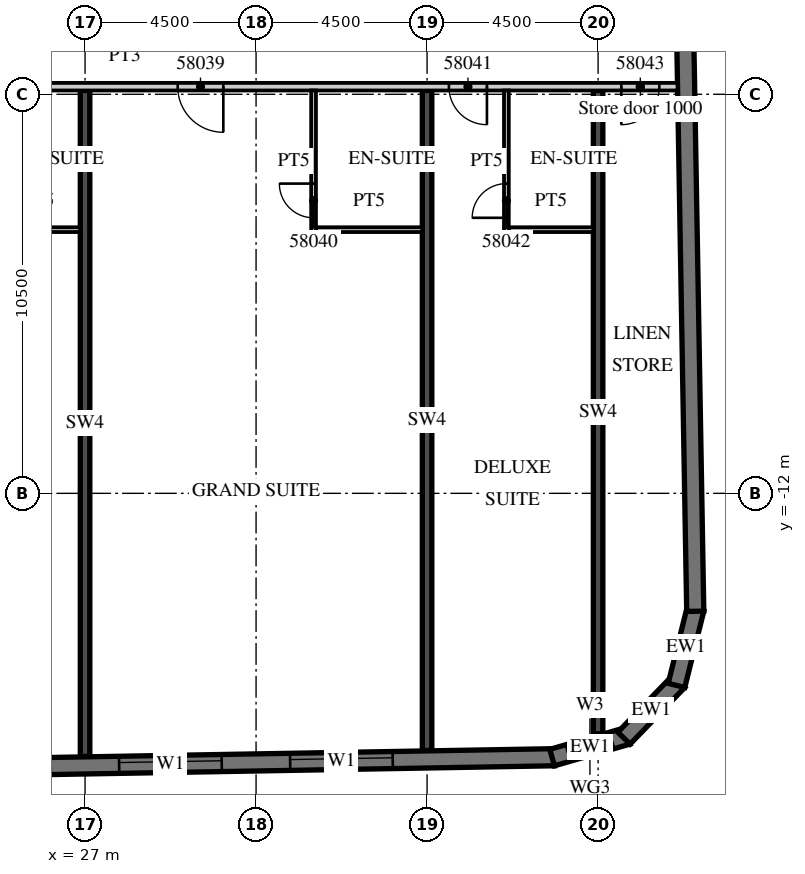
"""IFC4 building model, lengths in metres.
Left out: names, types, materials, properties, quantities, classifications, styles, units other than length and angle.
Written with IfcOpenShell. Run it as: python <this file> out.ifc"""

import sys

from ifc_helpers import new_model, si_unit, direction, frame, frame_2d, origin, place, context, subcontext, project, spatial, polyline, rectangle, outline, extrude, element, fill, save


model = new_model("IFC4")
c1 = context("Model", 3, precision=1e-05, world=origin(), true_north=direction((0.0, 1.0)))
c2 = subcontext(c1, "Body", "Model", "MODEL_VIEW")
j1 = project(units=[si_unit("LENGTHUNIT", "METRE"), si_unit("PLANEANGLEUNIT", "RADIAN")], contexts=[c1])
p1 = place(None, origin())
s1 = spatial("IfcSite", under=j1, at=p1, CompositionType="ELEMENT")
p2 = place(p1, origin())
s2 = spatial("IfcBuilding", under=s1, at=p2, CompositionType="ELEMENT")
p3 = place(p2, frame((0.0, 0.0, 237.5)))
s3 = spatial("IfcBuildingStorey", under=s2, at=p3, CompositionType="ELEMENT", Elevation=237.5)
p4 = place(p3, frame((27.0, -18.922, 0.0), z_axis=(0.0, 0.0, 1.0), x_axis=(0.0, 1.0, 0.0)))
e1 = element("IfcWall", 1, at=p4, inside=s3, PredefinedType="SHEAR", context=c2, shape_type="SweptSolid", body=[
    extrude(rectangle(XDim=17.522, YDim=0.25, at=frame_2d((8.761, 0.0))), origin(), (0.0, 0.0, 1.0), 3.3),
])
p5 = place(p3, frame((36.0, -18.765, 0.0), z_axis=(0.0, 0.0, 1.0), x_axis=(0.0, 1.0, 0.0)))
e2 = element("IfcWall", 2, at=p5, inside=s3, PredefinedType="SHEAR", context=c2, shape_type="SweptSolid", body=[
    extrude(rectangle(XDim=17.365, YDim=0.25, at=frame_2d((8.683, 0.0))), origin(), (0.0, 0.0, 1.0), 3.3),
])
p6 = place(p3, frame((40.5, -18.325, 0.0), z_axis=(0.0, 0.0, 1.0), x_axis=(0.0, 1.0, 0.0)))
e3 = element("IfcWall", 3, at=p6, inside=s3, PredefinedType="SHEAR", context=c2, shape_type="SweptSolid", body=[
    extrude(rectangle(XDim=16.925, YDim=0.25, at=frame_2d((8.463, 0.0))), origin(), (0.0, 0.0, 1.0), 3.3),
])
p7 = place(p3, frame((-13.504, -19.866, 0.0), z_axis=(0.0, 0.0, 1.0), x_axis=(0.999847672978, 0.017453676992, 0.0)))
e4 = element("IfcWall", 4, at=p7, inside=s3, PredefinedType="SOLIDWALL", context=c2, shape_type="SweptSolid", body=[
    extrude(rectangle(XDim=52.86, YDim=0.45, at=frame_2d((26.43, 0.0))), origin(), (0.0, 0.0, 1.0), 3.02),
])
p8 = place(p7, frame((0.9, 0.0, 0.45)))
e5 = element("IfcOpeningElement", 5, at=p8, cuts=e4, PredefinedType="OPENING", context=c2, shape_type="SweptSolid", body=[
    extrude(rectangle(XDim=2.7, YDim=2.25, at=frame_2d((1.35, 1.125))), frame((0.0, 0.235, 0.0), z_axis=(0.0, -1.0, 0.0), x_axis=(1.0, 0.0, 0.0)), (0.0, 0.0, 1.0), 0.47),
])
p9 = place(p7, frame((5.401, 0.0, 0.45)))
e6 = element("IfcOpeningElement", 6, at=p9, cuts=e4, PredefinedType="OPENING", context=c2, shape_type="SweptSolid", body=[
    extrude(rectangle(XDim=2.7, YDim=2.25, at=frame_2d((1.35, 1.125))), frame((0.0, 0.235, 0.0), z_axis=(0.0, -1.0, 0.0), x_axis=(1.0, 0.0, 0.0)), (0.0, 0.0, 1.0), 0.47),
])
p10 = place(p7, frame((9.902, 0.0, 0.45)))
e7 = element("IfcOpeningElement", 7, at=p10, cuts=e4, PredefinedType="OPENING", context=c2, shape_type="SweptSolid", body=[
    extrude(rectangle(XDim=2.7, YDim=2.25, at=frame_2d((1.35, 1.125))), frame((0.0, 0.235, 0.0), z_axis=(0.0, -1.0, 0.0), x_axis=(1.0, 0.0, 0.0)), (0.0, 0.0, 1.0), 0.47),
])
p11 = place(p7, frame((14.402, 0.0, 0.45)))
e8 = element("IfcOpeningElement", 8, at=p11, cuts=e4, PredefinedType="OPENING", context=c2, shape_type="SweptSolid", body=[
    extrude(rectangle(XDim=2.7, YDim=2.25, at=frame_2d((1.35, 1.125))), frame((0.0, 0.235, 0.0), z_axis=(0.0, -1.0, 0.0), x_axis=(1.0, 0.0, 0.0)), (0.0, 0.0, 1.0), 0.47),
])
p12 = place(p7, frame((18.903, 0.0, 0.45)))
e9 = element("IfcOpeningElement", 9, at=p12, cuts=e4, PredefinedType="OPENING", context=c2, shape_type="SweptSolid", body=[
    extrude(rectangle(XDim=2.7, YDim=2.25, at=frame_2d((1.35, 1.125))), frame((0.0, 0.235, 0.0), z_axis=(0.0, -1.0, 0.0), x_axis=(1.0, 0.0, 0.0)), (0.0, 0.0, 1.0), 0.47),
])
p13 = place(p7, frame((23.404, 0.0, 0.45)))
e10 = element("IfcOpeningElement", 10, at=p13, cuts=e4, PredefinedType="OPENING", context=c2, shape_type="SweptSolid", body=[
    extrude(rectangle(XDim=2.7, YDim=2.25, at=frame_2d((1.35, 1.125))), frame((0.0, 0.235, 0.0), z_axis=(0.0, -1.0, 0.0), x_axis=(1.0, 0.0, 0.0)), (0.0, 0.0, 1.0), 0.47),
])
p14 = place(p7, frame((27.904, 0.0, 0.45)))
e11 = element("IfcOpeningElement", 11, at=p14, cuts=e4, PredefinedType="OPENING", context=c2, shape_type="SweptSolid", body=[
    extrude(rectangle(XDim=2.7, YDim=2.25, at=frame_2d((1.35, 1.125))), frame((0.0, 0.235, 0.0), z_axis=(0.0, -1.0, 0.0), x_axis=(1.0, 0.0, 0.0)), (0.0, 0.0, 1.0), 0.47),
])
p15 = place(p7, frame((32.405, 0.0, 0.45)))
e12 = element("IfcOpeningElement", 12, at=p15, cuts=e4, PredefinedType="OPENING", context=c2, shape_type="SweptSolid", body=[
    extrude(rectangle(XDim=2.7, YDim=2.25, at=frame_2d((1.35, 1.125))), frame((0.0, 0.235, 0.0), z_axis=(0.0, -1.0, 0.0), x_axis=(1.0, 0.0, 0.0)), (0.0, 0.0, 1.0), 0.47),
])
p16 = place(p7, frame((36.906, 0.0, 0.45)))
e13 = element("IfcOpeningElement", 13, at=p16, cuts=e4, PredefinedType="OPENING", context=c2, shape_type="SweptSolid", body=[
    extrude(rectangle(XDim=2.7, YDim=2.25, at=frame_2d((1.35, 1.125))), frame((0.0, 0.235, 0.0), z_axis=(0.0, -1.0, 0.0), x_axis=(1.0, 0.0, 0.0)), (0.0, 0.0, 1.0), 0.47),
])
p17 = place(p7, frame((41.406, 0.0, 0.45)))
e14 = element("IfcOpeningElement", 14, at=p17, cuts=e4, PredefinedType="OPENING", context=c2, shape_type="SweptSolid", body=[
    extrude(rectangle(XDim=2.7, YDim=2.25, at=frame_2d((1.35, 1.125))), frame((0.0, 0.235, 0.0), z_axis=(0.0, -1.0, 0.0), x_axis=(1.0, 0.0, 0.0)), (0.0, 0.0, 1.0), 0.47),
])
p18 = place(p7, frame((45.907, 0.0, 0.45)))
e15 = element("IfcOpeningElement", 15, at=p18, cuts=e4, PredefinedType="OPENING", context=c2, shape_type="SweptSolid", body=[
    extrude(rectangle(XDim=2.7, YDim=2.25, at=frame_2d((1.35, 1.125))), frame((0.0, 0.235, 0.0), z_axis=(0.0, -1.0, 0.0), x_axis=(1.0, 0.0, 0.0)), (0.0, 0.0, 1.0), 0.47),
])
p19 = place(p3, frame((39.29, -18.952, 0.0), z_axis=(0.0, 0.0, 1.0), x_axis=(0.961247584925, 0.275686562016, 0.0)))
e16 = element("IfcWall", 16, at=p19, inside=s3, PredefinedType="SOLIDWALL", context=c2, shape_type="SweptSolid", body=[
    extrude(outline(polyline([(0.0, -0.225), (2.071, -0.225), (1.95, 0.225), (0.121, 0.225), (0.0, -0.225)])), origin(), (0.0, 0.0, 1.0), 3.02),
])
p20 = place(p19, frame((0.435, 0.0, 0.45)))
e17 = element("IfcOpeningElement", 17, at=p20, cuts=e16, PredefinedType="OPENING", context=c2, shape_type="SweptSolid", body=[
    extrude(rectangle(XDim=1.2, YDim=2.25, at=frame_2d((0.6, 1.125))), frame((0.0, 0.235, 0.0), z_axis=(0.0, -1.0, 0.0), x_axis=(1.0, 0.0, 0.0)), (0.0, 0.0, 1.0), 0.47),
])
p21 = place(p3, frame((41.181, -18.442, 0.0), z_axis=(0.0, 0.0, 1.0), x_axis=(0.694678672846, 0.719320193998, 0.0)))
e18 = element("IfcWall", 18, at=p21, inside=s3, PredefinedType="SOLIDWALL", context=c2, shape_type="SweptSolid", body=[
    extrude(outline(polyline([(0.0, -0.225), (2.071, -0.225), (1.95, 0.225), (0.121, 0.225), (0.0, -0.225)])), origin(), (0.0, 0.0, 1.0), 3.02),
])
p22 = place(p3, frame((42.563, -17.054, 0.0), z_axis=(0.0, 0.0, 1.0), x_axis=(0.241841950319, 0.970315655375, 0.0)))
e19 = element("IfcWall", 19, at=p22, inside=s3, PredefinedType="SOLIDWALL", context=c2, shape_type="SweptSolid", body=[
    extrude(outline(polyline([(0.0, -0.225), (2.071, -0.225), (1.95, 0.225), (0.121, 0.225), (0.0, -0.225)])), origin(), (0.0, 0.0, 1.0), 3.02),
])
p23 = place(p3, frame((43.057, -15.103, 0.0), z_axis=(0.0, 0.0, 1.0), x_axis=(-0.017452408953, 0.999847695112, 0.0)))
e20 = element("IfcWall", 20, at=p23, inside=s3, PredefinedType="SOLIDWALL", context=c2, shape_type="SweptSolid", body=[
    extrude(rectangle(XDim=33.0, YDim=0.45, at=frame_2d((16.5, 0.0))), origin(), (0.0, 0.0, 1.0), 3.02),
])
p24 = place(p3, frame((13.5, -1.3, 0.0), z_axis=(0.0, 0.0, 1.0), x_axis=(1.0, 0.0, 0.0)))
e21 = element("IfcWall", 21, at=p24, inside=s3, PredefinedType="PARTITIONING", context=c2, shape_type="SweptSolid", body=[
    extrude(rectangle(XDim=29.091, YDim=0.2, at=frame_2d((14.545, 0.0))), origin(), (0.0, 0.0, 1.0), 3.02),
])
p25 = place(p24, frame((0.575, 0.0, 0.0)))
e22 = element("IfcOpeningElement", 22, at=p25, cuts=e21, PredefinedType="OPENING", context=c2, shape_type="SweptSolid", body=[
    extrude(rectangle(XDim=1.0, YDim=2.1, at=frame_2d((0.5, 1.05))), frame((0.0, 0.11, 0.0), z_axis=(0.0, -1.0, 0.0), x_axis=(1.0, 0.0, 0.0)), (0.0, 0.0, 1.0), 0.22),
])
p26 = place(p24, frame((7.45, 0.0, 0.0)))
e23 = element("IfcOpeningElement", 23, at=p26, cuts=e21, PredefinedType="OPENING", context=c2, shape_type="SweptSolid", body=[
    extrude(rectangle(XDim=1.0, YDim=2.1, at=frame_2d((0.5, 1.05))), frame((0.0, 0.11, 0.0), z_axis=(0.0, -1.0, 0.0), x_axis=(1.0, 0.0, 0.0)), (0.0, 0.0, 1.0), 0.22),
])
p27 = place(p24, frame((9.55, 0.0, 0.0)))
e24 = element("IfcOpeningElement", 24, at=p27, cuts=e21, PredefinedType="OPENING", context=c2, shape_type="SweptSolid", body=[
    extrude(rectangle(XDim=1.0, YDim=2.1, at=frame_2d((0.5, 1.05))), frame((0.0, 0.11, 0.0), z_axis=(0.0, -1.0, 0.0), x_axis=(1.0, 0.0, 0.0)), (0.0, 0.0, 1.0), 0.22),
])
p28 = place(p24, frame((15.938, 0.0, 0.0)))
e25 = element("IfcOpeningElement", 25, at=p28, cuts=e21, PredefinedType="OPENING", context=c2, shape_type="SweptSolid", body=[
    extrude(rectangle(XDim=1.2, YDim=2.1, at=frame_2d((0.6, 1.05))), frame((0.0, 0.11, 0.0), z_axis=(0.0, -1.0, 0.0), x_axis=(1.0, 0.0, 0.0)), (0.0, 0.0, 1.0), 0.22),
])
p29 = place(p24, frame((23.075, 0.0, 0.0)))
e26 = element("IfcOpeningElement", 26, at=p29, cuts=e21, PredefinedType="OPENING", context=c2, shape_type="SweptSolid", body=[
    extrude(rectangle(XDim=1.0, YDim=2.1, at=frame_2d((0.5, 1.05))), frame((0.0, 0.11, 0.0), z_axis=(0.0, -1.0, 0.0), x_axis=(1.0, 0.0, 0.0)), (0.0, 0.0, 1.0), 0.22),
])
p30 = place(p24, frame((27.611, 0.0, 0.0)))
e27 = element("IfcOpeningElement", 27, at=p30, cuts=e21, PredefinedType="OPENING", context=c2, shape_type="SweptSolid", body=[
    extrude(rectangle(XDim=1.0, YDim=2.4, at=frame_2d((0.5, 1.2))), frame((0.0, 0.11, 0.0), z_axis=(0.0, -1.0, 0.0), x_axis=(1.0, 0.0, 0.0)), (0.0, 0.0, 1.0), 0.22),
])
p31 = place(p3, frame((24.625, -5.062, 0.0), z_axis=(0.0, 0.0, 1.0), x_axis=(1.0, 0.0, 0.0)))
e28 = element("IfcWall", 28, at=p31, inside=s3, PredefinedType="PARTITIONING", context=c2, shape_type="SweptSolid", body=[
    extrude(rectangle(XDim=2.25, YDim=0.125, at=frame_2d((1.125, 0.0))), origin(), (0.0, 0.0, 1.0), 3.02),
])
p32 = place(p3, frame((33.013, -5.125, 0.0), z_axis=(0.0, 0.0, 1.0), x_axis=(0.0, 1.0, 0.0)))
e29 = element("IfcWall", 29, at=p32, inside=s3, PredefinedType="PARTITIONING", context=c2, shape_type="SweptSolid", body=[
    extrude(rectangle(XDim=3.725, YDim=0.125, at=frame_2d((1.863, 0.0))), origin(), (0.0, 0.0, 1.0), 3.02),
])
p33 = place(p32, frame((0.375, 0.0, 0.0)))
e30 = element("IfcOpeningElement", 30, at=p33, cuts=e29, PredefinedType="OPENING", context=c2, shape_type="SweptSolid", body=[
    extrude(rectangle(XDim=0.9, YDim=2.1, at=frame_2d((0.45, 1.05))), frame((0.0, 0.073, 0.0), z_axis=(0.0, -1.0, 0.0), x_axis=(1.0, 0.0, 0.0)), (0.0, 0.0, 1.0), 0.145),
])
p34 = place(p3, frame((33.075, -5.062, 0.0), z_axis=(0.0, 0.0, 1.0), x_axis=(1.0, 0.0, 0.0)))
e31 = element("IfcWall", 31, at=p34, inside=s3, PredefinedType="PARTITIONING", context=c2, shape_type="SweptSolid", body=[
    extrude(rectangle(XDim=2.8, YDim=0.125, at=frame_2d((1.4, 0.0))), origin(), (0.0, 0.0, 1.0), 3.02),
])
p35 = place(p3, frame((38.087, -5.125, 0.0), z_axis=(0.0, 0.0, 1.0), x_axis=(0.0, 1.0, 0.0)))
e32 = element("IfcWall", 32, at=p35, inside=s3, PredefinedType="PARTITIONING", context=c2, shape_type="SweptSolid", body=[
    extrude(rectangle(XDim=3.725, YDim=0.125, at=frame_2d((1.863, 0.0))), origin(), (0.0, 0.0, 1.0), 3.02),
])
p36 = place(p35, frame((0.375, 0.0, 0.0)))
e33 = element("IfcOpeningElement", 33, at=p36, cuts=e32, PredefinedType="OPENING", context=c2, shape_type="SweptSolid", body=[
    extrude(rectangle(XDim=0.9, YDim=2.1, at=frame_2d((0.45, 1.05))), frame((0.0, 0.073, 0.0), z_axis=(0.0, -1.0, 0.0), x_axis=(1.0, 0.0, 0.0)), (0.0, 0.0, 1.0), 0.145),
])
p37 = place(p3, frame((38.15, -5.062, 0.0), z_axis=(0.0, 0.0, 1.0), x_axis=(1.0, 0.0, 0.0)))
e34 = element("IfcWall", 34, at=p37, inside=s3, PredefinedType="PARTITIONING", context=c2, shape_type="SweptSolid", body=[
    extrude(rectangle(XDim=2.225, YDim=0.125, at=frame_2d((1.113, 0.0))), origin(), (0.0, 0.0, 1.0), 3.02),
])
p38 = place(p17, origin())
e35 = element("IfcWindow", 35, at=p38, inside=s3, PartitioningType="SINGLE_PANEL", PredefinedType="WINDOW", context=c2, shape_type="SweptSolid", body=[
    extrude(rectangle(XDim=2.7, YDim=2.25, at=frame_2d((1.35, 1.125))), frame((0.0, 0.09, 0.0), z_axis=(0.0, -1.0, 0.0), x_axis=(1.0, 0.0, 0.0)), (0.0, 0.0, 1.0), 0.06),
])
fill(e14, e35)
p39 = place(p18, origin())
e36 = element("IfcWindow", 36, at=p39, inside=s3, PartitioningType="SINGLE_PANEL", PredefinedType="WINDOW", context=c2, shape_type="SweptSolid", body=[
    extrude(rectangle(XDim=2.7, YDim=2.25, at=frame_2d((1.35, 1.125))), frame((0.0, 0.09, 0.0), z_axis=(0.0, -1.0, 0.0), x_axis=(1.0, 0.0, 0.0)), (0.0, 0.0, 1.0), 0.06),
])
fill(e15, e36)
p40 = place(p20, origin())
e37 = element("IfcWindow", 37, at=p40, inside=s3, PartitioningType="SINGLE_PANEL", PredefinedType="WINDOW", context=c2, shape_type="SweptSolid", body=[
    extrude(rectangle(XDim=1.2, YDim=2.25, at=frame_2d((0.6, 1.125))), frame((0.0, 0.09, 0.0), z_axis=(0.0, -1.0, 0.0), x_axis=(1.0, 0.0, 0.0)), (0.0, 0.0, 1.0), 0.06),
])
fill(e17, e37)
p41 = place(p28, origin())
e38 = element("IfcDoor", 38, at=p41, inside=s3, OperationType="SINGLE_SWING_RIGHT", PredefinedType="DOOR", context=c2, shape_type="SweptSolid", body=[
    extrude(rectangle(XDim=1.2, YDim=2.1, at=frame_2d((0.6, 1.05))), frame((0.0, 0.025, 0.0), z_axis=(0.0, -1.0, 0.0), x_axis=(1.0, 0.0, 0.0)), (0.0, 0.0, 1.0), 0.05),
])
fill(e25, e38)
p42 = place(p33, origin())
e39 = element("IfcDoor", 39, at=p42, inside=s3, OperationType="SINGLE_SWING_RIGHT", PredefinedType="DOOR", context=c2, shape_type="SweptSolid", body=[
    extrude(rectangle(XDim=0.9, YDim=2.1, at=frame_2d((0.45, 1.05))), frame((0.0, 0.025, 0.0), z_axis=(0.0, -1.0, 0.0), x_axis=(1.0, 0.0, 0.0)), (0.0, 0.0, 1.0), 0.05),
])
fill(e30, e39)
p43 = place(p29, origin())
e40 = element("IfcDoor", 40, at=p43, inside=s3, OperationType="SINGLE_SWING_RIGHT", PredefinedType="DOOR", context=c2, shape_type="SweptSolid", body=[
    extrude(rectangle(XDim=1.0, YDim=2.1, at=frame_2d((0.5, 1.05))), frame((0.0, 0.025, 0.0), z_axis=(0.0, -1.0, 0.0), x_axis=(1.0, 0.0, 0.0)), (0.0, 0.0, 1.0), 0.05),
])
fill(e26, e40)
p44 = place(p36, origin())
e41 = element("IfcDoor", 41, at=p44, inside=s3, OperationType="SINGLE_SWING_LEFT", PredefinedType="DOOR", context=c2, shape_type="SweptSolid", body=[
    extrude(rectangle(XDim=0.9, YDim=2.1, at=frame_2d((0.45, 1.05))), frame((0.0, 0.025, 0.0), z_axis=(0.0, -1.0, 0.0), x_axis=(1.0, 0.0, 0.0)), (0.0, 0.0, 1.0), 0.05),
])
fill(e33, e41)
p45 = place(p30, origin())
e42 = element("IfcDoor", 42, at=p45, inside=s3, OperationType="SINGLE_SWING_LEFT", PredefinedType="DOOR", context=c2, shape_type="SweptSolid", body=[
    extrude(rectangle(XDim=1.0, YDim=2.4, at=frame_2d((0.5, 1.2))), frame((0.0, 0.025, 0.0), z_axis=(0.0, -1.0, 0.0), x_axis=(1.0, 0.0, 0.0)), (0.0, 0.0, 1.0), 0.05),
])
fill(e27, e42)
save(model, sys.argv[1])
